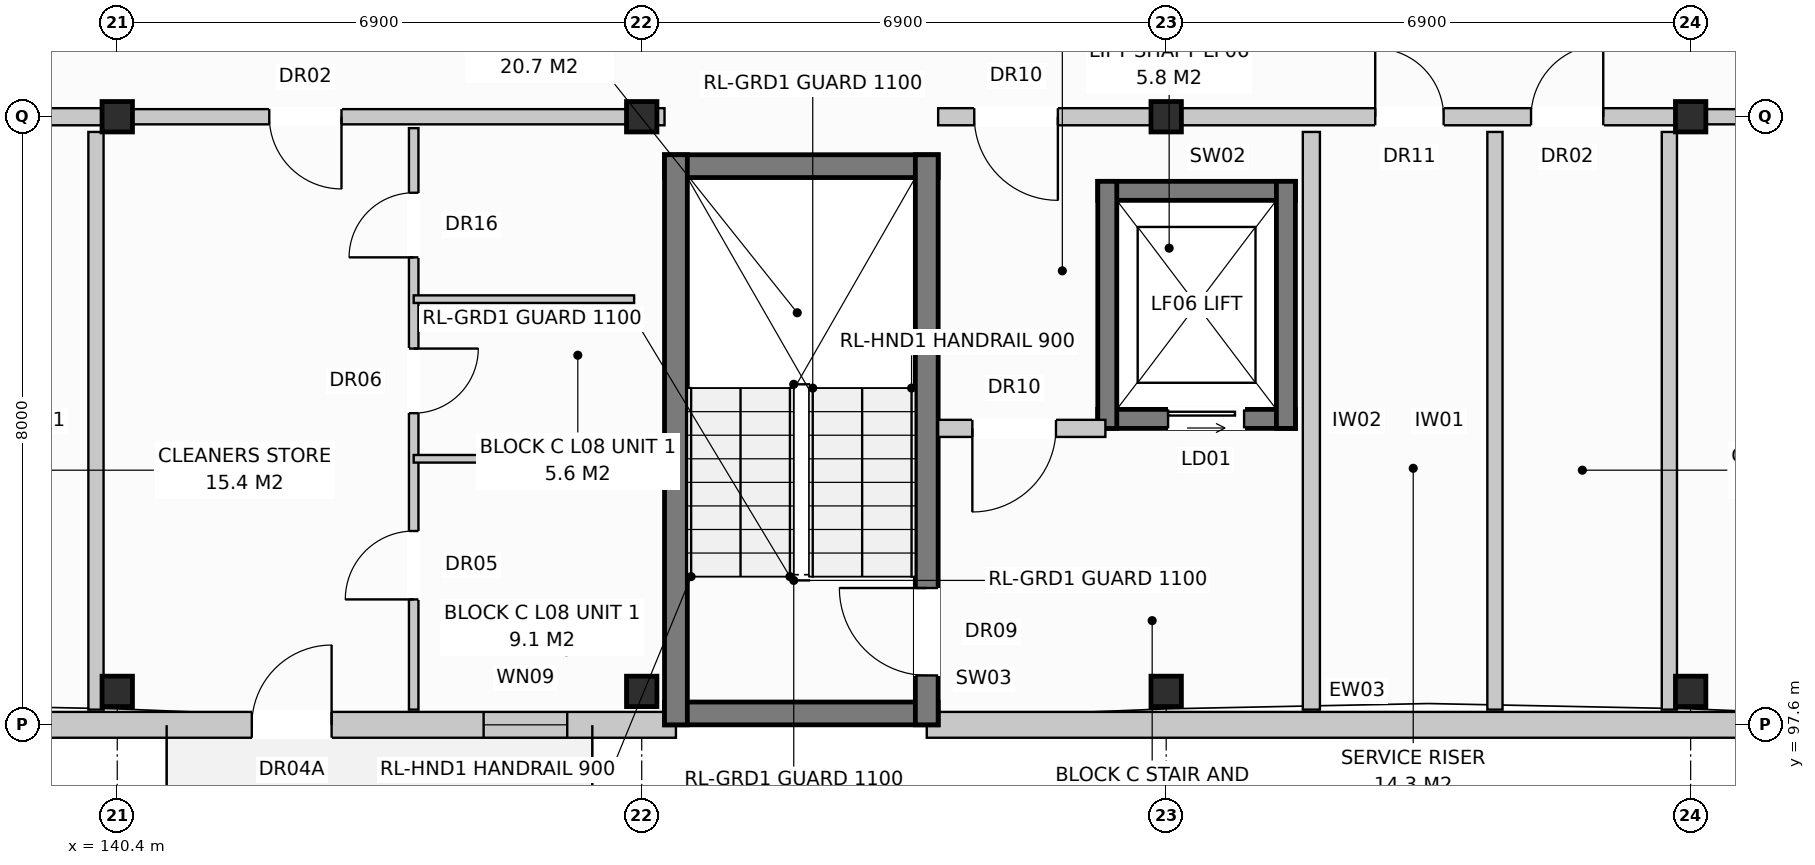
"""IFC4 building model, lengths in metres.
Left out: names, types, materials, properties, quantities, classifications, styles, units other than length and angle.
Written with IfcOpenShell. Run it as: python <this file> out.ifc"""

import sys

from ifc_helpers import new_model, si_unit, direction, frame, frame_2d, origin, origin_with_axes, origin_2d, place, context, subcontext, project, spatial, rectangle, extrude, element, fill, save


model = new_model("IFC4")
c1 = context("Model", 3, precision=1e-05, world=origin(), true_north=direction((0.0, 1.0)))
c2 = subcontext(c1, "Body", "Model", "MODEL_VIEW")
j1 = project(units=[si_unit("LENGTHUNIT", "METRE"), si_unit("PLANEANGLEUNIT", "RADIAN")], contexts=[c1])
p1 = place(None, origin())
s1 = spatial("IfcSite", under=j1, at=p1, CompositionType="ELEMENT")
p2 = place(p1, origin())
s2 = spatial("IfcBuilding", under=s1, at=p2, CompositionType="ELEMENT")
p3 = place(p2, frame((0.0, 0.0, 27.2)))
s3 = spatial("IfcBuildingStorey", under=s2, at=p3, CompositionType="ELEMENT", Elevation=27.2)
for number, where, z_axis, x_axis in (
    (1, (140.4, 98.04, 0.0), (0.0, 0.0, 1.0), (1.0, 0.0, 0.0)),
    (2, (140.4, 105.6, 0.0), (0.0, 0.0, 1.0), (1.0, 0.0, 0.0)),
    (3, (147.3, 98.04, 0.0), (0.0, 0.0, 1.0), (1.0, 0.0, 0.0)),
    (4, (147.3, 105.6, 0.0), (0.0, 0.0, 1.0), (1.0, 0.0, 0.0)),
    (5, (154.2, 98.04, 0.0), (0.0, 0.0, 1.0), (1.0, 0.0, 0.0)),
    (6, (154.2, 105.6, 0.0), (0.0, 0.0, 1.0), (1.0, 0.0, 0.0)),
    (7, (161.1, 98.04, 0.0), (0.0, 0.0, 1.0), (1.0, 0.0, 0.0)),
    (8, (161.1, 105.6, 0.0), (0.0, 0.0, 1.0), (1.0, 0.0, 0.0)),
):
    element("IfcColumn", number, at=place(p3, frame(where, z_axis=z_axis, x_axis=x_axis)), inside=s3, PredefinedType="COLUMN", context=c2, shape_type="SweptSolid", body=[
        extrude(rectangle(XDim=0.4, YDim=0.4, at=origin_2d()), origin(), (0.0, 0.0, 1.0), 3.2),
    ])
p4 = place(p3, frame((130.35, 97.6, 0.0), z_axis=(0.0, 0.0, 1.0), x_axis=(1.0, 0.0, 0.0)))
e9 = element("IfcWall", 9, at=p4, inside=s3, PredefinedType="STANDARD", context=c2, shape_type="SweptSolid", body=[
    extrude(rectangle(XDim=17.4, YDim=0.34, at=frame_2d((8.7, 0.0))), origin(), (0.0, 0.0, 1.0), 2.96),
])
p5 = place(p4, frame((11.82, 0.0, 0.0)))
e10 = element("IfcOpeningElement", 10, at=p5, cuts=e9, PredefinedType="OPENING", context=c2, shape_type="SweptSolid", body=[
    extrude(rectangle(XDim=1.05, YDim=2.12, at=frame_2d((0.525, 1.06))), frame((0.0, 0.182, 0.0), z_axis=(0.0, -1.0, 0.0), x_axis=(1.0, 0.0, 0.0)), (0.0, 0.0, 1.0), 0.364),
])
p6 = place(p4, frame((14.87, 0.0, 0.72)))
e11 = element("IfcOpeningElement", 11, at=p6, cuts=e9, PredefinedType="OPENING", context=c2, shape_type="SweptSolid", body=[
    extrude(rectangle(XDim=1.1, YDim=1.5, at=frame_2d((0.55, 0.75))), frame((0.0, 0.182, 0.0), z_axis=(0.0, -1.0, 0.0), x_axis=(1.0, 0.0, 0.0)), (0.0, 0.0, 1.0), 0.364),
])
p7 = place(p3, frame((151.05, 97.6, 0.0), z_axis=(0.0, 0.0, 1.0), x_axis=(1.0, 0.0, 0.0)))
e12 = element("IfcWall", 12, at=p7, inside=s3, PredefinedType="STANDARD", context=c2, shape_type="SweptSolid", body=[
    extrude(rectangle(XDim=16.79, YDim=0.34, at=frame_2d((8.395, 0.0))), origin(), (0.0, 0.0, 1.0), 2.96),
])
p8 = place(p7, frame((11.07, 0.0, 0.8)))
e13 = element("IfcOpeningElement", 13, at=p8, cuts=e12, PredefinedType="OPENING", context=c2, shape_type="SweptSolid", body=[
    extrude(rectangle(XDim=1.9, YDim=1.85, at=frame_2d((0.95, 0.925))), frame((0.0, 0.182, 0.0), z_axis=(0.0, -1.0, 0.0), x_axis=(1.0, 0.0, 0.0)), (0.0, 0.0, 1.0), 0.364),
])
p9 = place(p7, frame((14.235, 0.0, 0.8)))
e14 = element("IfcOpeningElement", 14, at=p9, cuts=e12, PredefinedType="OPENING", context=c2, shape_type="SweptSolid", body=[
    extrude(rectangle(XDim=1.95, YDim=1.65, at=frame_2d((0.975, 0.825))), frame((0.0, 0.182, 0.0), z_axis=(0.0, -1.0, 0.0), x_axis=(1.0, 0.0, 0.0)), (0.0, 0.0, 1.0), 0.364),
])
p10 = place(p3, frame((140.12, 97.8, 0.0), z_axis=(0.0, 0.0, 1.0), x_axis=(0.0, 1.0, 0.0)))
e15 = element("IfcWall", 15, at=p10, inside=s3, PredefinedType="PARTITIONING", context=c2, shape_type="SweptSolid", body=[
    extrude(rectangle(XDim=7.6, YDim=0.2, at=frame_2d((3.8, 0.0))), origin(), (0.0, 0.0, 1.0), 2.96),
])
p11 = place(p3, frame((130.5, 105.6, 0.0), z_axis=(0.0, 0.0, 1.0), x_axis=(1.0, 0.0, 0.0)))
e16 = element("IfcWall", 16, at=p11, inside=s3, PredefinedType="PARTITIONING", context=c2, shape_type="SweptSolid", body=[
    extrude(rectangle(XDim=9.9, YDim=0.225, at=frame_2d((4.95, 0.0))), origin(), (0.0, 0.0, 1.0), 2.4),
])
p12 = place(p11, frame((0.475, 0.0, 0.0)))
e17 = element("IfcOpeningElement", 17, at=p12, cuts=e16, PredefinedType="OPENING", context=c2, shape_type="SweptSolid", body=[
    extrude(rectangle(XDim=1.1, YDim=2.15, at=frame_2d((0.55, 1.075))), frame((0.0, 0.125, 0.0), z_axis=(0.0, -1.0, 0.0), x_axis=(1.0, 0.0, 0.0)), (0.0, 0.0, 1.0), 0.249),
])
p13 = place(p11, frame((5.75, 0.0, 0.0)))
e18 = element("IfcOpeningElement", 18, at=p13, cuts=e16, PredefinedType="OPENING", context=c2, shape_type="SweptSolid", body=[
    extrude(rectangle(XDim=0.9, YDim=2.1, at=frame_2d((0.45, 1.05))), frame((0.0, 0.125, 0.0), z_axis=(0.0, -1.0, 0.0), x_axis=(1.0, 0.0, 0.0)), (0.0, 0.0, 1.0), 0.249),
])
p14 = place(p11, frame((7.8, 0.0, 0.0)))
e19 = element("IfcOpeningElement", 19, at=p14, cuts=e16, PredefinedType="OPENING", context=c2, shape_type="SweptSolid", body=[
    extrude(rectangle(XDim=0.95, YDim=2.15, at=frame_2d((0.475, 1.075))), frame((0.0, 0.125, 0.0), z_axis=(0.0, -1.0, 0.0), x_axis=(1.0, 0.0, 0.0)), (0.0, 0.0, 1.0), 0.249),
])
for number, where, z_axis, x_axis in (
    (20, (147.6, 97.75, 0.0), (0.0, 0.0, 1.0), (1.0, 0.0, 0.0)),
    (21, (147.6, 104.95, 0.0), (0.0, 0.0, 1.0), (1.0, 0.0, 0.0)),
):
    element("IfcWall", number, at=place(p3, frame(where, z_axis=z_axis, x_axis=x_axis)), inside=s3, PredefinedType="SHEAR", context=c2, shape_type="SweptSolid", body=[
        extrude(rectangle(XDim=3.6, YDim=0.3, at=frame_2d((1.8, 0.0))), origin(), (0.0, 0.0, 1.0), 2.96),
    ])
p15 = place(p3, frame((147.75, 97.6, 0.0), z_axis=(0.0, 0.0, 1.0), x_axis=(0.0, 1.0, 0.0)))
e22 = element("IfcWall", 22, at=p15, inside=s3, PredefinedType="SHEAR", context=c2, shape_type="SweptSolid", body=[
    extrude(rectangle(XDim=7.5, YDim=0.3, at=frame_2d((3.75, 0.0))), origin(), (0.0, 0.0, 1.0), 2.96),
])
p16 = place(p3, frame((151.05, 97.6, 0.0), z_axis=(0.0, 0.0, 1.0), x_axis=(0.0, 1.0, 0.0)))
e23 = element("IfcWall", 23, at=p16, inside=s3, PredefinedType="SHEAR", context=c2, shape_type="SweptSolid", body=[
    extrude(rectangle(XDim=7.5, YDim=0.3, at=frame_2d((3.75, 0.0))), origin(), (0.0, 0.0, 1.0), 2.96),
])
p17 = place(p16, frame((0.65, 0.0, 0.0)))
e24 = element("IfcOpeningElement", 24, at=p17, cuts=e23, PredefinedType="OPENING", context=c2, shape_type="SweptSolid", body=[
    extrude(rectangle(XDim=1.15, YDim=2.15, at=frame_2d((0.575, 1.075))), frame((0.0, 0.162, 0.0), z_axis=(0.0, -1.0, 0.0), x_axis=(1.0, 0.0, 0.0)), (0.0, 0.0, 1.0), 0.324),
])
p18 = place(p3, frame((153.3, 101.625, 0.0), z_axis=(0.0, 0.0, 1.0), x_axis=(1.0, 0.0, 0.0)))
e25 = element("IfcWall", 25, at=p18, inside=s3, PredefinedType="SHEAR", context=c2, shape_type="SweptSolid", body=[
    extrude(rectangle(XDim=2.6, YDim=0.25, at=frame_2d((1.3, 0.0))), origin(), (0.0, 0.0, 1.0), 2.96),
])
p19 = place(p18, frame((0.925, 0.0, 0.0)))
e26 = element("IfcOpeningElement", 26, at=p19, cuts=e25, PredefinedType="OPENING", context=c2, shape_type="SweptSolid", body=[
    extrude(rectangle(XDim=1.0, YDim=2.1, at=frame_2d((0.5, 1.05))), frame((0.0, 0.137, 0.0), z_axis=(0.0, -1.0, 0.0), x_axis=(1.0, 0.0, 0.0)), (0.0, 0.0, 1.0), 0.274),
])
p20 = place(p3, frame((153.3, 104.625, 0.0), z_axis=(0.0, 0.0, 1.0), x_axis=(1.0, 0.0, 0.0)))
e27 = element("IfcWall", 27, at=p20, inside=s3, PredefinedType="SHEAR", context=c2, shape_type="SweptSolid", body=[
    extrude(rectangle(XDim=2.6, YDim=0.25, at=frame_2d((1.3, 0.0))), origin(), (0.0, 0.0, 1.0), 2.96),
])
for number, where, z_axis, x_axis in (
    (28, (153.425, 101.5, 0.0), (0.0, 0.0, 1.0), (0.0, 1.0, 0.0)),
    (29, (155.775, 101.5, 0.0), (0.0, 0.0, 1.0), (0.0, 1.0, 0.0)),
):
    element("IfcWall", number, at=place(p3, frame(where, z_axis=z_axis, x_axis=x_axis)), inside=s3, PredefinedType="SHEAR", context=c2, shape_type="SweptSolid", body=[
        extrude(rectangle(XDim=3.25, YDim=0.25, at=frame_2d((1.625, 0.0))), origin(), (0.0, 0.0, 1.0), 2.96),
    ])
p21 = place(p3, frame((156.11, 97.8, 0.0), z_axis=(0.0, 0.0, 1.0), x_axis=(0.0, 1.0, 0.0)))
e30 = element("IfcWall", 30, at=p21, inside=s3, PredefinedType="PARTITIONING", context=c2, shape_type="SweptSolid", body=[
    extrude(rectangle(XDim=7.6, YDim=0.225, at=frame_2d((3.8, 0.0))), origin(), (0.0, 0.0, 1.0), 2.59),
])
p22 = place(p3, frame((151.2, 101.5, 0.0), z_axis=(0.0, 0.0, 1.0), x_axis=(1.0, 0.0, 0.0)))
e31 = element("IfcWall", 31, at=p22, inside=s3, PredefinedType="PARTITIONING", context=c2, shape_type="SweptSolid", body=[
    extrude(rectangle(XDim=2.2, YDim=0.225, at=frame_2d((1.1, 0.0))), origin(), (0.0, 0.0, 1.0), 2.96),
])
p23 = place(p22, frame((0.45, 0.0, 0.0)))
e32 = element("IfcOpeningElement", 32, at=p23, cuts=e31, PredefinedType="OPENING", context=c2, shape_type="SweptSolid", body=[
    extrude(rectangle(XDim=1.1, YDim=2.15, at=frame_2d((0.55, 1.075))), frame((0.0, 0.125, 0.0), z_axis=(0.0, -1.0, 0.0), x_axis=(1.0, 0.0, 0.0)), (0.0, 0.0, 1.0), 0.249),
])
p24 = place(p3, frame((147.3, 105.6, 0.0), z_axis=(0.0, 0.0, 1.0), x_axis=(1.0, 0.0, 0.0)))
e33 = element("IfcWall", 33, at=p24, inside=s3, PredefinedType="PARTITIONING", context=c2, shape_type="SweptSolid", body=[
    extrude(rectangle(XDim=0.3, YDim=0.225, at=frame_2d((0.15, 0.0))), origin(), (0.0, 0.0, 1.0), 2.96),
])
p25 = place(p3, frame((158.525, 97.8, 0.0), z_axis=(0.0, 0.0, 1.0), x_axis=(0.0, 1.0, 0.0)))
e34 = element("IfcWall", 34, at=p25, inside=s3, PredefinedType="PARTITIONING", context=c2, shape_type="SweptSolid", body=[
    extrude(rectangle(XDim=7.6, YDim=0.2, at=frame_2d((3.8, 0.0))), origin(), (0.0, 0.0, 1.0), 2.96),
])
p26 = place(p3, frame((160.82, 97.8, 0.0), z_axis=(0.0, 0.0, 1.0), x_axis=(0.0, 1.0, 0.0)))
e35 = element("IfcWall", 35, at=p26, inside=s3, PredefinedType="PARTITIONING", context=c2, shape_type="SweptSolid", body=[
    extrude(rectangle(XDim=7.6, YDim=0.2, at=frame_2d((3.8, 0.0))), origin(), (0.0, 0.0, 1.0), 2.4),
])
p27 = place(p3, frame((151.2, 105.6, 0.0), z_axis=(0.0, 0.0, 1.0), x_axis=(1.0, 0.0, 0.0)))
e36 = element("IfcWall", 36, at=p27, inside=s3, PredefinedType="PARTITIONING", context=c2, shape_type="SweptSolid", body=[
    extrude(rectangle(XDim=9.9, YDim=0.225, at=frame_2d((4.95, 0.0))), origin(), (0.0, 0.0, 1.0), 2.4),
])
p28 = place(p27, frame((0.475, 0.0, 0.0)))
e37 = element("IfcOpeningElement", 37, at=p28, cuts=e36, PredefinedType="OPENING", context=c2, shape_type="SweptSolid", body=[
    extrude(rectangle(XDim=1.1, YDim=2.15, at=frame_2d((0.55, 1.075))), frame((0.0, 0.125, 0.0), z_axis=(0.0, -1.0, 0.0), x_axis=(1.0, 0.0, 0.0)), (0.0, 0.0, 1.0), 0.249),
])
p29 = place(p27, frame((5.75, 0.0, 0.0)))
e38 = element("IfcOpeningElement", 38, at=p29, cuts=e36, PredefinedType="OPENING", context=c2, shape_type="SweptSolid", body=[
    extrude(rectangle(XDim=0.9, YDim=2.1, at=frame_2d((0.45, 1.05))), frame((0.0, 0.125, 0.0), z_axis=(0.0, -1.0, 0.0), x_axis=(1.0, 0.0, 0.0)), (0.0, 0.0, 1.0), 0.249),
])
p30 = place(p27, frame((7.8, 0.0, 0.0)))
e39 = element("IfcOpeningElement", 39, at=p30, cuts=e36, PredefinedType="OPENING", context=c2, shape_type="SweptSolid", body=[
    extrude(rectangle(XDim=0.95, YDim=2.15, at=frame_2d((0.475, 1.075))), frame((0.0, 0.125, 0.0), z_axis=(0.0, -1.0, 0.0), x_axis=(1.0, 0.0, 0.0)), (0.0, 0.0, 1.0), 0.249),
])
p31 = place(p3, frame((140.4, 105.6, 0.0), z_axis=(0.0, 0.0, 1.0), x_axis=(1.0, 0.0, 0.0)))
e40 = element("IfcWall", 40, at=p31, inside=s3, PredefinedType="PARTITIONING", context=c2, shape_type="SweptSolid", body=[
    extrude(rectangle(XDim=6.9, YDim=0.2, at=frame_2d((3.45, 0.0))), origin(), (0.0, 0.0, 1.0), 2.4),
])
p32 = place(p31, frame((2.0, 0.0, 0.0)))
e41 = element("IfcOpeningElement", 41, at=p32, cuts=e40, PredefinedType="OPENING", context=c2, shape_type="SweptSolid", body=[
    extrude(rectangle(XDim=0.95, YDim=2.15, at=frame_2d((0.475, 1.075))), frame((0.0, 0.112, 0.0), z_axis=(0.0, -1.0, 0.0), x_axis=(1.0, 0.0, 0.0)), (0.0, 0.0, 1.0), 0.224),
])
p33 = place(p3, frame((144.3, 105.45, 0.0), z_axis=(0.0, 0.0, 1.0), x_axis=(0.0, -1.0, 0.0)))
e42 = element("IfcWall", 42, at=p33, inside=s3, PredefinedType="PARTITIONING", context=c2, shape_type="SweptSolid", body=[
    extrude(rectangle(XDim=7.65, YDim=0.125, at=frame_2d((3.825, 0.0))), origin(), (0.0, 0.0, 1.0), 2.96),
])
p34 = place(p33, frame((0.85, 0.0, 0.0)))
e43 = element("IfcOpeningElement", 43, at=p34, cuts=e42, PredefinedType="OPENING", context=c2, shape_type="SweptSolid", body=[
    extrude(rectangle(XDim=0.85, YDim=2.1, at=frame_2d((0.425, 1.05))), frame((0.0, 0.074, 0.0), z_axis=(0.0, -1.0, 0.0), x_axis=(1.0, 0.0, 0.0)), (0.0, 0.0, 1.0), 0.149),
])
p35 = place(p33, frame((2.9, 0.0, 0.0)))
e44 = element("IfcOpeningElement", 44, at=p35, cuts=e42, PredefinedType="OPENING", context=c2, shape_type="SweptSolid", body=[
    extrude(rectangle(XDim=0.85, YDim=2.05, at=frame_2d((0.425, 1.025))), frame((0.0, 0.074, 0.0), z_axis=(0.0, -1.0, 0.0), x_axis=(1.0, 0.0, 0.0)), (0.0, 0.0, 1.0), 0.149),
])
p36 = place(p33, frame((5.3, 0.0, 0.0)))
e45 = element("IfcOpeningElement", 45, at=p36, cuts=e42, PredefinedType="OPENING", context=c2, shape_type="SweptSolid", body=[
    extrude(rectangle(XDim=0.9, YDim=2.1, at=frame_2d((0.45, 1.05))), frame((0.0, 0.074, 0.0), z_axis=(0.0, -1.0, 0.0), x_axis=(1.0, 0.0, 0.0)), (0.0, 0.0, 1.0), 0.149),
])
for number, where, z_axis, x_axis in (
    (46, (144.3, 103.2, 0.0), (0.0, 0.0, 1.0), (1.0, 0.0, 0.0)),
    (47, (144.3, 101.1, 0.0), (0.0, 0.0, 1.0), (1.0, 0.0, 0.0)),
):
    element("IfcWall", number, at=place(p3, frame(where, z_axis=z_axis, x_axis=x_axis)), inside=s3, PredefinedType="PARTITIONING", context=c2, shape_type="SweptSolid", body=[
        extrude(rectangle(XDim=2.9, YDim=0.1, at=frame_2d((1.45, 0.0))), origin(), (0.0, 0.0, 1.0), 2.96),
    ])
p37 = place(p3, frame((161.1, 105.6, 0.0), z_axis=(0.0, 0.0, 1.0), x_axis=(1.0, 0.0, 0.0)))
e48 = element("IfcWall", 48, at=p37, inside=s3, PredefinedType="PARTITIONING", context=c2, shape_type="SweptSolid", body=[
    extrude(rectangle(XDim=6.9, YDim=0.2, at=frame_2d((3.45, 0.0))), origin(), (0.0, 0.0, 1.0), 2.4),
])
p38 = place(p37, frame((2.0, 0.0, 0.0)))
e49 = element("IfcOpeningElement", 49, at=p38, cuts=e48, PredefinedType="OPENING", context=c2, shape_type="SweptSolid", body=[
    extrude(rectangle(XDim=0.95, YDim=2.15, at=frame_2d((0.475, 1.075))), frame((0.0, 0.112, 0.0), z_axis=(0.0, -1.0, 0.0), x_axis=(1.0, 0.0, 0.0)), (0.0, 0.0, 1.0), 0.224),
])
p39 = place(p5, origin_with_axes())
e50 = element("IfcDoor", 50, at=p39, inside=s3, OperationType="SINGLE_SWING_RIGHT", PredefinedType="DOOR", context=c2, shape_type="SweptSolid", body=[
    extrude(rectangle(XDim=1.05, YDim=2.12, at=frame_2d((0.525, 1.06))), frame((0.0, 0.025, 0.0), z_axis=(0.0, -1.0, 0.0), x_axis=(1.0, 0.0, 0.0)), (0.0, 0.0, 1.0), 0.05),
])
fill(e10, e50)
p40 = place(p6, origin_with_axes())
e51 = element("IfcWindow", 51, at=p40, inside=s3, PartitioningType="SINGLE_PANEL", PredefinedType="WINDOW", context=c2, shape_type="SweptSolid", body=[
    extrude(rectangle(XDim=1.1, YDim=1.5, at=frame_2d((0.55, 0.75))), frame((0.0, 0.03, 0.0), z_axis=(0.0, -1.0, 0.0), x_axis=(1.0, 0.0, 0.0)), (0.0, 0.0, 1.0), 0.06),
])
fill(e11, e51)
p41 = place(p17, origin_with_axes())
e52 = element("IfcDoor", 52, at=p41, inside=s3, OperationType="SINGLE_SWING_RIGHT", PredefinedType="DOOR", context=c2, shape_type="SweptSolid", body=[
    extrude(rectangle(XDim=1.15, YDim=2.15, at=frame_2d((0.575, 1.075))), frame((0.0, 0.025, 0.0), z_axis=(0.0, -1.0, 0.0), x_axis=(1.0, 0.0, 0.0)), (0.0, 0.0, 1.0), 0.05),
])
fill(e24, e52)
p42 = place(p19, origin_with_axes())
e53 = element("IfcDoor", 53, at=p42, inside=s3, OperationType="SLIDING_TO_LEFT", PredefinedType="DOOR", context=c2, shape_type="SweptSolid", body=[
    extrude(rectangle(XDim=1.0, YDim=2.1, at=frame_2d((0.5, 1.05))), frame((0.0, 0.025, 0.0), z_axis=(0.0, -1.0, 0.0), x_axis=(1.0, 0.0, 0.0)), (0.0, 0.0, 1.0), 0.05),
])
fill(e26, e53)
p43 = place(p23, frame((1.1, 0.0, 0.0), z_axis=(0.0, 0.0, 1.0), x_axis=(-1.0, 0.0, 0.0)))
e54 = element("IfcDoor", 54, at=p43, inside=s3, OperationType="SINGLE_SWING_LEFT", PredefinedType="DOOR", context=c2, shape_type="SweptSolid", body=[
    extrude(rectangle(XDim=1.1, YDim=2.15, at=frame_2d((0.55, 1.075))), frame((0.0, 0.025, 0.0), z_axis=(0.0, -1.0, 0.0), x_axis=(1.0, 0.0, 0.0)), (0.0, 0.0, 1.0), 0.05),
])
fill(e32, e54)
p44 = place(p28, frame((1.1, 0.0, 0.0), z_axis=(0.0, 0.0, 1.0), x_axis=(-1.0, 0.0, 0.0)))
e55 = element("IfcDoor", 55, at=p44, inside=s3, OperationType="SINGLE_SWING_RIGHT", PredefinedType="DOOR", context=c2, shape_type="SweptSolid", body=[
    extrude(rectangle(XDim=1.1, YDim=2.15, at=frame_2d((0.55, 1.075))), frame((0.0, 0.025, 0.0), z_axis=(0.0, -1.0, 0.0), x_axis=(1.0, 0.0, 0.0)), (0.0, 0.0, 1.0), 0.05),
])
fill(e37, e55)
p45 = place(p29, origin_with_axes())
e56 = element("IfcDoor", 56, at=p45, inside=s3, OperationType="SINGLE_SWING_LEFT", PredefinedType="DOOR", context=c2, shape_type="SweptSolid", body=[
    extrude(rectangle(XDim=0.9, YDim=2.1, at=frame_2d((0.45, 1.05))), frame((0.0, 0.025, 0.0), z_axis=(0.0, -1.0, 0.0), x_axis=(1.0, 0.0, 0.0)), (0.0, 0.0, 1.0), 0.05),
])
fill(e38, e56)
p46 = place(p30, origin_with_axes())
e57 = element("IfcDoor", 57, at=p46, inside=s3, OperationType="SINGLE_SWING_RIGHT", PredefinedType="DOOR", context=c2, shape_type="SweptSolid", body=[
    extrude(rectangle(XDim=0.95, YDim=2.15, at=frame_2d((0.475, 1.075))), frame((0.0, 0.025, 0.0), z_axis=(0.0, -1.0, 0.0), x_axis=(1.0, 0.0, 0.0)), (0.0, 0.0, 1.0), 0.05),
])
fill(e39, e57)
p47 = place(p32, frame((0.95, 0.0, 0.0), z_axis=(0.0, 0.0, 1.0), x_axis=(-1.0, 0.0, 0.0)))
e58 = element("IfcDoor", 58, at=p47, inside=s3, OperationType="SINGLE_SWING_RIGHT", PredefinedType="DOOR", context=c2, shape_type="SweptSolid", body=[
    extrude(rectangle(XDim=0.95, YDim=2.15, at=frame_2d((0.475, 1.075))), frame((0.0, 0.025, 0.0), z_axis=(0.0, -1.0, 0.0), x_axis=(1.0, 0.0, 0.0)), (0.0, 0.0, 1.0), 0.05),
])
fill(e41, e58)
p48 = place(p34, frame((0.85, 0.0, 0.0), z_axis=(0.0, 0.0, 1.0), x_axis=(-1.0, 0.0, 0.0)))
e59 = element("IfcDoor", 59, at=p48, inside=s3, OperationType="SINGLE_SWING_RIGHT", PredefinedType="DOOR", context=c2, shape_type="SweptSolid", body=[
    extrude(rectangle(XDim=0.85, YDim=2.1, at=frame_2d((0.425, 1.05))), frame((0.0, 0.025, 0.0), z_axis=(0.0, -1.0, 0.0), x_axis=(1.0, 0.0, 0.0)), (0.0, 0.0, 1.0), 0.05),
])
fill(e43, e59)
p49 = place(p35, origin_with_axes())
e60 = element("IfcDoor", 60, at=p49, inside=s3, OperationType="SINGLE_SWING_LEFT", PredefinedType="DOOR", context=c2, shape_type="SweptSolid", body=[
    extrude(rectangle(XDim=0.85, YDim=2.05, at=frame_2d((0.425, 1.025))), frame((0.0, 0.025, 0.0), z_axis=(0.0, -1.0, 0.0), x_axis=(1.0, 0.0, 0.0)), (0.0, 0.0, 1.0), 0.05),
])
fill(e44, e60)
p50 = place(p36, frame((0.9, 0.0, 0.0), z_axis=(0.0, 0.0, 1.0), x_axis=(-1.0, 0.0, 0.0)))
e61 = element("IfcDoor", 61, at=p50, inside=s3, OperationType="SINGLE_SWING_RIGHT", PredefinedType="DOOR", context=c2, shape_type="SweptSolid", body=[
    extrude(rectangle(XDim=0.9, YDim=2.1, at=frame_2d((0.45, 1.05))), frame((0.0, 0.025, 0.0), z_axis=(0.0, -1.0, 0.0), x_axis=(1.0, 0.0, 0.0)), (0.0, 0.0, 1.0), 0.05),
])
fill(e45, e61)
save(model, sys.argv[1])
